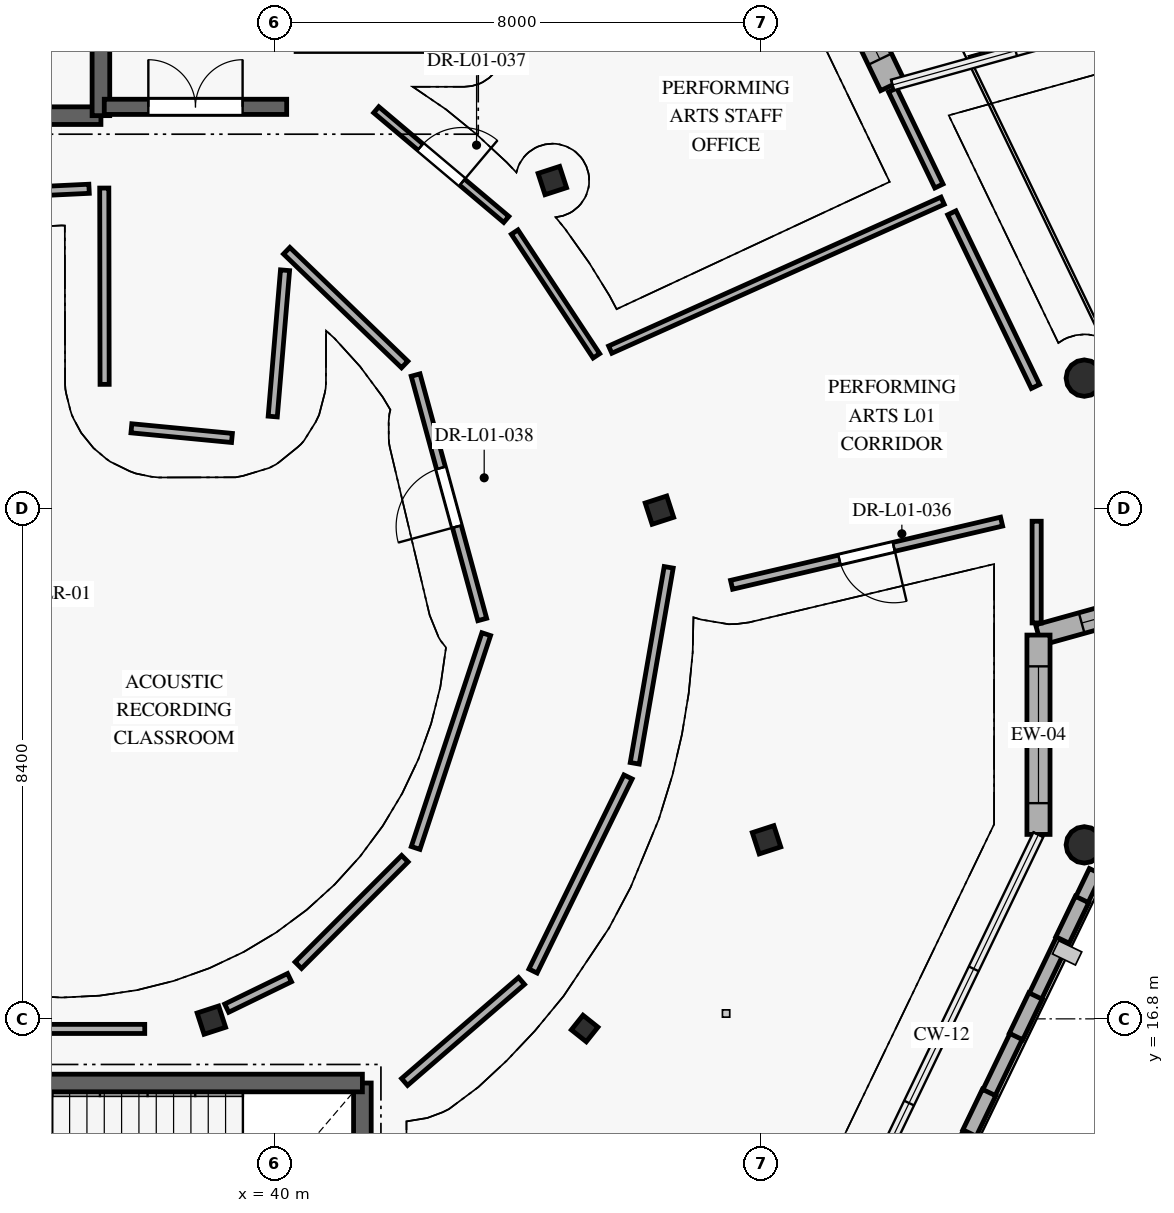
"""IFC4 building model, lengths in metres.
Left out: names, types, materials, properties, quantities, classifications, styles, units other than length and angle.
Written with IfcOpenShell. Run it as: python <this file> out.ifc"""

import sys

from ifc_helpers import new_model, si_unit, direction, frame, frame_2d, origin, origin_2d, place, context, subcontext, project, spatial, rectangle, circle, i_section, extrude, element, fill, save


model = new_model("IFC4")
c1 = context("Model", 3, precision=1e-05, world=origin(), true_north=direction((0.0, 1.0)))
c2 = subcontext(c1, "Body", "Model", "MODEL_VIEW")
j1 = project(units=[si_unit("LENGTHUNIT", "METRE"), si_unit("PLANEANGLEUNIT", "RADIAN")], contexts=[c1])
p1 = place(None, origin())
s1 = spatial("IfcSite", under=j1, at=p1, CompositionType="ELEMENT")
p2 = place(p1, origin())
s2 = spatial("IfcBuilding", under=s1, at=p2, CompositionType="ELEMENT")
p3 = place(p2, frame((0.0, 0.0, 4.2)))
s3 = spatial("IfcBuildingStorey", under=s2, at=p3, CompositionType="ELEMENT", Elevation=4.2)
for number, where, z_axis, x_axis in (
    (1, (38.961, 16.779, 0.0), (0.0, 0.0, 1.0), (0.951, 0.309, 0.0)),
    (2, (48.092, 19.746, 0.0), (0.0, 0.0, 1.0), (0.951, 0.309, 0.0)),
    (3, (46.33, 25.167, 0.0), (0.0, 0.0, 1.0), (0.951, 0.309, 0.0)),
    (4, (44.569, 30.588, 0.0), (0.0, 0.0, 1.0), (0.951, 0.309, 0.0)),
):
    element("IfcColumn", number, at=place(p3, frame(where, z_axis=z_axis, x_axis=x_axis)), inside=s3, PredefinedType="COLUMN", context=c2, shape_type="SweptSolid", body=[
        extrude(i_section(OverallWidth=0.373, OverallDepth=0.368, WebThickness=0.014, FlangeThickness=0.024, FilletRadius=0.015, at=origin_2d()), origin(), (0.0, 0.0, 1.0), 4.2),
    ])
for number, where, z_axis, x_axis in (
    (5, (53.317, 27.338, 0.0), (0.0, 0.0, 1.0), (-0.223, 0.975, 0.0)),
    (6, (53.317, 19.662, 0.0), (0.0, 0.0, 1.0), (0.223, 0.975, 0.0)),
):
    element("IfcColumn", number, at=place(p3, frame(where, z_axis=z_axis, x_axis=x_axis)), inside=s3, PredefinedType="COLUMN", context=c2, shape_type="SweptSolid", body=[
        extrude(circle(Radius=0.3, at=origin_2d()), origin(), (0.0, 0.0, 1.0), 4.2),
    ])
p4 = place(p3, frame((45.1, 16.642, 0.0), z_axis=(0.0, 0.0, 1.0), x_axis=(0.623470308046, 0.781847027868, 0.0)))
e7 = element("IfcColumn", 7, at=p4, inside=s3, PredefinedType="COLUMN", context=c2, shape_type="SweptSolid", body=[
    extrude(i_section(OverallWidth=0.307, OverallDepth=0.314, WebThickness=0.012, FlangeThickness=0.019, FilletRadius=0.015, at=origin_2d()), origin(), (0.0, 0.0, 1.0), 4.2),
])
p5 = place(p3, frame((59.259, 24.975, 0.0), z_axis=(0.0, 0.0, 1.0), x_axis=(-0.963400554219, -0.268065984658, 0.0)))
e8 = element("IfcWall", 8, at=p5, inside=s3, PredefinedType="SOLIDWALL", context=c2, shape_type="SweptSolid", body=[
    extrude(rectangle(XDim=6.95, YDim=0.35, at=frame_2d((3.475, 0.0))), origin(), (0.0, 0.0, 1.0), 3.94),
])
p6 = place(p5, frame((0.988, 0.0, 0.85)))
e9 = element("IfcOpeningElement", 9, at=p6, cuts=e8, PredefinedType="OPENING", context=c2, shape_type="SweptSolid", body=[
    extrude(rectangle(XDim=1.5, YDim=1.3, at=frame_2d((0.75, 0.65))), frame((0.0, 0.185, 0.0), z_axis=(0.0, -1.0, 0.0), x_axis=(1.0, 0.0, 0.0)), (0.0, 0.0, 1.0), 0.37),
])
p7 = place(p5, frame((4.212, 0.0, 0.85)))
e10 = element("IfcOpeningElement", 10, at=p7, cuts=e8, PredefinedType="OPENING", context=c2, shape_type="SweptSolid", body=[
    extrude(rectangle(XDim=2.0, YDim=1.3, at=frame_2d((1.0, 0.65))), frame((0.0, 0.185, 0.0), z_axis=(0.0, -1.0, 0.0), x_axis=(1.0, 0.0, 0.0)), (0.0, 0.0, 1.0), 0.37),
])
p8 = place(p3, frame((52.564, 23.112, 0.0), z_axis=(0.0, 0.0, 1.0), x_axis=(0.0, -1.0, 0.0)))
e11 = element("IfcWall", 11, at=p8, inside=s3, PredefinedType="SOLIDWALL", context=c2, shape_type="SweptSolid", body=[
    extrude(rectangle(XDim=3.279, YDim=0.38, at=frame_2d((1.639, 0.0))), origin(), (0.0, 0.0, 1.0), 3.94),
])
p9 = place(p8, frame((0.514, 0.0, 0.85)))
e12 = element("IfcOpeningElement", 12, at=p9, cuts=e11, PredefinedType="OPENING", context=c2, shape_type="SweptSolid", body=[
    extrude(rectangle(XDim=2.25, YDim=1.3, at=frame_2d((1.125, 0.65))), frame((0.0, 0.2, 0.0), z_axis=(0.0, -1.0, 0.0), x_axis=(1.0, 0.0, 0.0)), (0.0, 0.0, 1.0), 0.4),
])
p10 = place(p3, frame((49.382, 33.773, 0.0), z_axis=(0.0, 0.0, 1.0), x_axis=(0.433922119058, -0.90095038409, 0.0)))
e13 = element("IfcWall", 13, at=p10, inside=s3, PredefinedType="SOLIDWALL", context=c2, shape_type="SweptSolid", body=[
    extrude(rectangle(XDim=1.792, YDim=0.425, at=frame_2d((0.896, 0.0))), origin(), (0.0, 0.0, 1.0), 3.94),
])
p11 = place(p10, frame((0.471, 0.0, 0.85)))
e14 = element("IfcOpeningElement", 14, at=p11, cuts=e13, PredefinedType="OPENING", context=c2, shape_type="SweptSolid", body=[
    extrude(rectangle(XDim=0.85, YDim=1.4, at=frame_2d((0.425, 0.7))), frame((0.0, 0.222, 0.0), z_axis=(0.0, -1.0, 0.0), x_axis=(1.0, 0.0, 0.0)), (0.0, 0.0, 1.0), 0.445),
])
p12 = place(p3, frame((50.444, 12.875, 0.0), z_axis=(0.0, 0.0, 1.0), x_axis=(0.433874990127, 0.900973081142, 0.0)))
e15 = element("IfcWall", 15, at=p12, inside=s3, PredefinedType="ELEMENTEDWALL", context=c2, shape_type="SweptSolid", body=[
    extrude(rectangle(XDim=7.047, YDim=0.225, at=frame_2d((3.523, 0.0))), origin(), (0.0, 0.0, 1.0), 1.09),
])
p13 = place(p3, frame((51.43, 14.922, 1.09), z_axis=(0.0, 0.0, 1.0), x_axis=(0.433835457528, 0.900992117497, 0.0)))
e16 = element("IfcWall", 16, at=p13, inside=s3, PredefinedType="ELEMENTEDWALL", context=c2, shape_type="SweptSolid", body=[
    extrude(rectangle(XDim=0.74, YDim=0.245, at=frame_2d((0.37, 0.0))), origin(), (0.0, 0.0, 1.0), 2.85),
])
p14 = place(p3, frame((52.195, 16.51, 1.09), z_axis=(0.0, 0.0, 1.0), x_axis=(0.433964448544, 0.900929995837, 0.0)))
e17 = element("IfcWall", 17, at=p14, inside=s3, PredefinedType="ELEMENTEDWALL", context=c2, shape_type="SweptSolid", body=[
    extrude(rectangle(XDim=0.74, YDim=0.245, at=frame_2d((0.37, 0.0))), origin(), (0.0, 0.0, 1.0), 2.85),
])
p15 = place(p3, frame((52.959, 18.097, 1.09), z_axis=(0.0, 0.0, 1.0), x_axis=(0.433835457528, 0.900992117497, 0.0)))
e18 = element("IfcWall", 18, at=p15, inside=s3, PredefinedType="ELEMENTEDWALL", context=c2, shape_type="SweptSolid", body=[
    extrude(rectangle(XDim=0.74, YDim=0.245, at=frame_2d((0.37, 0.0))), origin(), (0.0, 0.0, 1.0), 2.85),
])
p16 = place(p3, frame((30.255, 31.655, 0.0), z_axis=(0.0, 0.0, 1.0), x_axis=(1.0, 0.0, 0.0)))
e19 = element("IfcWall", 19, at=p16, inside=s3, PredefinedType="SHEAR", context=c2, shape_type="SweptSolid", body=[
    extrude(rectangle(XDim=6.89, YDim=0.29, at=frame_2d((3.445, 0.0))), origin(), (0.0, 0.0, 1.0), 3.95),
])
p17 = place(p3, frame((37.145, 31.655, 0.0), z_axis=(0.0, 0.0, 1.0), x_axis=(0.0, 1.0, 0.0)))
e20 = element("IfcWall", 20, at=p17, inside=s3, PredefinedType="SHEAR", context=c2, shape_type="SweptSolid", body=[
    extrude(rectangle(XDim=6.29, YDim=0.29, at=frame_2d((3.145, 0.0))), origin(), (0.0, 0.0, 1.0), 3.95),
])
p18 = place(p17, frame((2.52, 0.0, 0.0)))
e21 = element("IfcOpeningElement", 21, at=p18, cuts=e20, PredefinedType="OPENING", context=c2, shape_type="SweptSolid", body=[
    extrude(rectangle(XDim=1.25, YDim=2.1, at=frame_2d((0.625, 1.05))), frame((0.0, 0.155, 0.0), z_axis=(0.0, -1.0, 0.0), x_axis=(1.0, 0.0, 0.0)), (0.0, 0.0, 1.0), 0.31),
])
p19 = place(p3, frame((37.2, 31.8, 0.0), z_axis=(0.0, 0.0, 1.0), x_axis=(1.0, 0.0, 0.0)))
e22 = element("IfcWall", 22, at=p19, inside=s3, PredefinedType="SHEAR", context=c2, shape_type="SweptSolid", body=[
    extrude(rectangle(XDim=3.0, YDim=0.25, at=frame_2d((1.5, 0.0))), origin(), (0.0, 0.0, 1.0), 3.95),
])
p20 = place(p19, frame((0.725, 0.0, 0.0)))
e23 = element("IfcOpeningElement", 23, at=p20, cuts=e22, PredefinedType="OPENING", context=c2, shape_type="SweptSolid", body=[
    extrude(rectangle(XDim=1.55, YDim=2.15, at=frame_2d((0.775, 1.075))), frame((0.0, 0.135, 0.0), z_axis=(0.0, -1.0, 0.0), x_axis=(1.0, 0.0, 0.0)), (0.0, 0.0, 1.0), 0.27),
])
p21 = place(p3, frame((41.445, 9.655, 0.0), z_axis=(0.0, 0.0, 1.0), x_axis=(0.0, 1.0, 0.0)))
e24 = element("IfcWall", 24, at=p21, inside=s3, PredefinedType="SHEAR", context=c2, shape_type="SweptSolid", body=[
    extrude(rectangle(XDim=6.09, YDim=0.29, at=frame_2d((3.045, 0.0))), origin(), (0.0, 0.0, 1.0), 3.95),
])
p22 = place(p3, frame((41.445, 15.745, 0.0), z_axis=(0.0, 0.0, 1.0), x_axis=(-1.0, 0.0, 0.0)))
e25 = element("IfcWall", 25, at=p22, inside=s3, PredefinedType="SHEAR", context=c2, shape_type="SweptSolid", body=[
    extrude(rectangle(XDim=6.79, YDim=0.29, at=frame_2d((3.395, 0.0))), origin(), (0.0, 0.0, 1.0), 3.95),
])
p23 = place(p3, frame((40.247, 17.478, 0.0), z_axis=(0.0, 0.0, 1.0), x_axis=(-0.899429373924, -0.437066129234, 0.0)))
e26 = element("IfcWall", 26, at=p23, inside=s3, PredefinedType="PARTITIONING", context=c2, shape_type="SweptSolid", body=[
    extrude(rectangle(XDim=1.148, YDim=0.15, at=frame_2d((0.574, 0.0))), origin(), (0.0, 0.0, 1.0), 3.219),
])
p24 = place(p3, frame((51.957, 24.978, 0.0), z_axis=(0.0, 0.0, 1.0), x_axis=(-0.973682617982, -0.227908225917, 0.0)))
e27 = element("IfcWall", 27, at=p24, inside=s3, PredefinedType="PARTITIONING", context=c2, shape_type="SweptSolid", body=[
    extrude(rectangle(XDim=4.56, YDim=0.15, at=frame_2d((2.28, 0.0))), origin(), (0.0, 0.0, 1.0), 3.9),
])
p25 = place(p24, frame((1.82, 0.0, 0.0)))
e28 = element("IfcOpeningElement", 28, at=p25, cuts=e27, PredefinedType="OPENING", context=c2, shape_type="SweptSolid", body=[
    extrude(rectangle(XDim=0.92, YDim=2.08, at=frame_2d((0.46, 1.04))), frame((0.0, 0.085, 0.0), z_axis=(0.0, -1.0, 0.0), x_axis=(1.0, 0.0, 0.0)), (0.0, 0.0, 1.0), 0.17),
])
p26 = place(p3, frame((46.482, 24.226, 0.0), z_axis=(0.0, 0.0, 1.0), x_axis=(-0.170701699763, -0.985322754075, 0.0)))
e29 = element("IfcWall", 29, at=p26, inside=s3, PredefinedType="PARTITIONING", context=c2, shape_type="SweptSolid", body=[
    extrude(rectangle(XDim=3.271, YDim=0.15, at=frame_2d((1.635, 0.0))), origin(), (0.0, 0.0, 1.0), 3.9),
])
p27 = place(p3, frame((45.814, 20.779, 0.0), z_axis=(0.0, 0.0, 1.0), x_axis=(-0.439779254339, -0.89810589991, 0.0)))
e30 = element("IfcWall", 30, at=p27, inside=s3, PredefinedType="PARTITIONING", context=c2, shape_type="SweptSolid", body=[
    extrude(rectangle(XDim=3.554, YDim=0.15, at=frame_2d((1.777, 0.0))), origin(), (0.0, 0.0, 1.0), 3.9),
])
p28 = place(p3, frame((44.062, 17.424, 0.0), z_axis=(0.0, 0.0, 1.0), x_axis=(-0.756768999512, -0.653682401, 0.0)))
e31 = element("IfcWall", 31, at=p28, inside=s3, PredefinedType="PARTITIONING", context=c2, shape_type="SweptSolid", body=[
    extrude(rectangle(XDim=2.541, YDim=0.15, at=frame_2d((1.271, 0.0))), origin(), (0.0, 0.0, 1.0), 3.9),
])
p29 = place(p3, frame((41.673, 31.752, 0.0), z_axis=(0.0, 0.0, 1.0), x_axis=(0.764524009618, -0.644595251858, 0.0)))
e32 = element("IfcWall", 32, at=p29, inside=s3, PredefinedType="PARTITIONING", context=c2, shape_type="SweptSolid", body=[
    extrude(rectangle(XDim=2.797, YDim=0.13, at=frame_2d((1.398, 0.0))), origin(), (0.0, 0.0, 1.0), 3.9),
])
p30 = place(p29, frame((0.948, 0.0, 0.0)))
e33 = element("IfcOpeningElement", 33, at=p30, cuts=e32, PredefinedType="OPENING", context=c2, shape_type="SweptSolid", body=[
    extrude(rectangle(XDim=0.9, YDim=2.05, at=frame_2d((0.45, 1.025))), frame((0.0, 0.075, 0.0), z_axis=(0.0, -1.0, 0.0), x_axis=(1.0, 0.0, 0.0)), (0.0, 0.0, 1.0), 0.15),
])
p31 = place(p3, frame((43.949, 29.74, 0.0), z_axis=(0.0, 0.0, 1.0), x_axis=(0.551022081773, -0.83449066226, 0.0)))
e34 = element("IfcWall", 34, at=p31, inside=s3, PredefinedType="PARTITIONING", context=c2, shape_type="SweptSolid", body=[
    extrude(rectangle(XDim=2.439, YDim=0.13, at=frame_2d((1.22, 0.0))), origin(), (0.0, 0.0, 1.0), 3.369),
])
p32 = place(p3, frame((45.521, 27.807, 0.0), z_axis=(0.0, 0.0, 1.0), x_axis=(0.912607408179, 0.408837031758, 0.0)))
e35 = element("IfcWall", 35, at=p32, inside=s3, PredefinedType="PARTITIONING", context=c2, shape_type="SweptSolid", body=[
    extrude(rectangle(XDim=5.99, YDim=0.13, at=frame_2d((2.995, 0.0))), origin(), (0.0, 0.0, 1.0), 3.9),
])
p33 = place(p3, frame((42.32, 19.611, 0.0), z_axis=(0.0, 0.0, 1.0), x_axis=(0.313635484033, 0.949543460383, 0.0)))
e36 = element("IfcWall", 36, at=p33, inside=s3, PredefinedType="PARTITIONING", context=c2, shape_type="SweptSolid", body=[
    extrude(rectangle(XDim=3.703, YDim=0.15, at=frame_2d((1.852, 0.0))), origin(), (0.0, 0.0, 1.0), 3.9),
])
p34 = place(p3, frame((43.416, 23.368, 0.0), z_axis=(0.0, 0.0, 1.0), x_axis=(-0.262938935949, 0.964812477097, 0.0)))
e37 = element("IfcWall", 37, at=p34, inside=s3, PredefinedType="PARTITIONING", context=c2, shape_type="SweptSolid", body=[
    extrude(rectangle(XDim=4.167, YDim=0.15, at=frame_2d((2.083, 0.0))), origin(), (0.0, 0.0, 1.0), 3.9),
])
p35 = place(p34, frame((1.584, 0.0, 0.0)))
e38 = element("IfcOpeningElement", 38, at=p35, cuts=e37, PredefinedType="OPENING", context=c2, shape_type="SweptSolid", body=[
    extrude(rectangle(XDim=1.0, YDim=2.1, at=frame_2d((0.5, 1.05))), frame((0.0, 0.085, 0.0), z_axis=(0.0, -1.0, 0.0), x_axis=(1.0, 0.0, 0.0)), (0.0, 0.0, 1.0), 0.17),
])
p36 = place(p3, frame((42.141, 27.562, 0.0), z_axis=(0.0, 0.0, 1.0), x_axis=(-0.719849143542, 0.694130542867, 0.0)))
e39 = element("IfcWall", 39, at=p36, inside=s3, PredefinedType="PARTITIONING", context=c2, shape_type="SweptSolid", body=[
    extrude(rectangle(XDim=2.696, YDim=0.15, at=frame_2d((1.348, 0.0))), origin(), (0.0, 0.0, 1.0), 3.9),
])
p37 = place(p3, frame((40.173, 29.112, 0.0), z_axis=(0.0, 0.0, 1.0), x_axis=(-0.083924087796, -0.996472150884, 0.0)))
e40 = element("IfcWall", 40, at=p37, inside=s3, PredefinedType="PARTITIONING", context=c2, shape_type="SweptSolid", body=[
    extrude(rectangle(XDim=2.415, YDim=0.15, at=frame_2d((1.207, 0.0))), origin(), (0.0, 0.0, 1.0), 3.9),
])
p38 = place(p3, frame((39.3, 26.354, 0.0), z_axis=(0.0, 0.0, 1.0), x_axis=(-0.995426515274, 0.095530375746, 0.0)))
e41 = element("IfcWall", 41, at=p38, inside=s3, PredefinedType="PARTITIONING", context=c2, shape_type="SweptSolid", body=[
    extrude(rectangle(XDim=1.661, YDim=0.15, at=frame_2d((0.831, 0.0))), origin(), (0.0, 0.0, 1.0), 3.9),
])
p39 = place(p3, frame((37.206, 27.236, 0.0), z_axis=(0.0, 0.0, 1.0), x_axis=(-0.001814879044, 0.999998353106, 0.0)))
e42 = element("IfcWall", 42, at=p39, inside=s3, PredefinedType="PARTITIONING", context=c2, shape_type="SweptSolid", body=[
    extrude(rectangle(XDim=3.229, YDim=0.15, at=frame_2d((1.614, 0.0))), origin(), (0.0, 0.0, 1.0), 3.9),
])
p40 = place(p3, frame((36.95, 30.452, 0.0), z_axis=(0.0, 0.0, 1.0), x_axis=(-0.998855948809, -0.04782043004, 0.0)))
e43 = element("IfcWall", 43, at=p40, inside=s3, PredefinedType="PARTITIONING", context=c2, shape_type="SweptSolid", body=[
    extrude(rectangle(XDim=1.818, YDim=0.15, at=frame_2d((0.909, 0.0))), origin(), (0.0, 0.0, 1.0), 3.9),
])
p41 = place(p3, frame((35.135, 16.635, 0.0), z_axis=(0.0, 0.0, 1.0), x_axis=(1.0, 0.0, 0.0)))
e44 = element("IfcWall", 44, at=p41, inside=s3, PredefinedType="PARTITIONING", context=c2, shape_type="SweptSolid", body=[
    extrude(rectangle(XDim=2.731, YDim=0.15, at=frame_2d((1.365, 0.0))), origin(), (0.0, 0.0, 1.0), 3.219),
])
p42 = place(p3, frame((40.391, 17.682, 0.0), z_axis=(0.0, 0.0, 1.0), x_axis=(0.70715603118, 0.707057527763, 0.0)))
e45 = element("IfcWall", 45, at=p42, inside=s3, PredefinedType="PARTITIONING", context=c2, shape_type="SweptSolid", body=[
    extrude(rectangle(XDim=2.479, YDim=0.15, at=frame_2d((1.239, 0.0))), origin(), (0.0, 0.0, 1.0), 3.9),
])
p43 = place(p3, frame((52.534, 24.984, 0.0), z_axis=(0.0, 0.0, 1.0), x_axis=(0.0, -1.0, 0.0)))
e46 = element("IfcWall", 46, at=p43, inside=s3, PredefinedType="PARTITIONING", context=c2, shape_type="SweptSolid", body=[
    extrude(rectangle(XDim=1.673, YDim=0.15, at=frame_2d((0.836, 0.0))), origin(), (0.0, 0.0, 1.0), 3.9),
])
p44 = place(p3, frame((50.166, 32.077, 0.0), z_axis=(0.0, 0.0, 1.0), x_axis=(0.433907727198, -0.900957315458, 0.0)))
e47 = element("IfcWall", 47, at=p44, inside=s3, PredefinedType="PARTITIONING", context=c2, shape_type="SweptSolid", body=[
    extrude(rectangle(XDim=1.753, YDim=0.15, at=frame_2d((0.876, 0.0))), origin(), (0.0, 0.0, 1.0), 3.9),
])
p45 = place(p3, frame((51.138, 30.057, 0.0), z_axis=(0.0, 0.0, 1.0), x_axis=(0.433887398365, -0.900967105693, 0.0)))
e48 = element("IfcWall", 48, at=p45, inside=s3, PredefinedType="PARTITIONING", context=c2, shape_type="SweptSolid", body=[
    extrude(rectangle(XDim=3.17, YDim=0.15, at=frame_2d((1.585, 0.0))), origin(), (0.0, 0.0, 1.0), 3.9),
])
p46 = place(p7, origin())
e49 = element("IfcWindow", 49, at=p46, inside=s3, PartitioningType="SINGLE_PANEL", PredefinedType="WINDOW", context=c2, shape_type="SweptSolid", body=[
    extrude(rectangle(XDim=2.0, YDim=1.3, at=frame_2d((1.0, 0.65))), frame((0.0, 0.03, 0.0), z_axis=(0.0, -1.0, 0.0), x_axis=(1.0, 0.0, 0.0)), (0.0, 0.0, 1.0), 0.06),
])
fill(e10, e49)
p47 = place(p9, origin())
e50 = element("IfcWindow", 50, at=p47, inside=s3, PartitioningType="SINGLE_PANEL", PredefinedType="WINDOW", context=c2, shape_type="SweptSolid", body=[
    extrude(rectangle(XDim=2.25, YDim=1.3, at=frame_2d((1.125, 0.65))), frame((0.0, 0.03, 0.0), z_axis=(0.0, -1.0, 0.0), x_axis=(1.0, 0.0, 0.0)), (0.0, 0.0, 1.0), 0.06),
])
fill(e12, e50)
p48 = place(p11, origin())
e51 = element("IfcWindow", 51, at=p48, inside=s3, PartitioningType="SINGLE_PANEL", PredefinedType="WINDOW", context=c2, shape_type="SweptSolid", body=[
    extrude(rectangle(XDim=0.85, YDim=1.4, at=frame_2d((0.425, 0.7))), frame((0.0, 0.03, 0.0), z_axis=(0.0, -1.0, 0.0), x_axis=(1.0, 0.0, 0.0)), (0.0, 0.0, 1.0), 0.06),
])
fill(e14, e51)
p49 = place(p20, origin())
e52 = element("IfcDoor", 52, at=p49, inside=s3, OperationType="DOUBLE_DOOR_SINGLE_SWING", PredefinedType="DOOR", context=c2, shape_type="SweptSolid", body=[
    extrude(rectangle(XDim=1.55, YDim=2.15, at=frame_2d((0.775, 1.075))), frame((0.0, 0.025, 0.0), z_axis=(0.0, -1.0, 0.0), x_axis=(1.0, 0.0, 0.0)), (0.0, 0.0, 1.0), 0.05),
])
fill(e23, e52)
p50 = place(p25, origin())
e53 = element("IfcDoor", 53, at=p50, inside=s3, OperationType="SINGLE_SWING_LEFT", PredefinedType="DOOR", context=c2, shape_type="SweptSolid", body=[
    extrude(rectangle(XDim=0.92, YDim=2.08, at=frame_2d((0.46, 1.04))), frame((0.0, 0.025, 0.0), z_axis=(0.0, -1.0, 0.0), x_axis=(1.0, 0.0, 0.0)), (0.0, 0.0, 1.0), 0.05),
])
fill(e28, e53)
p51 = place(p30, origin())
e54 = element("IfcDoor", 54, at=p51, inside=s3, OperationType="SINGLE_SWING_RIGHT", PredefinedType="DOOR", context=c2, shape_type="SweptSolid", body=[
    extrude(rectangle(XDim=0.9, YDim=2.05, at=frame_2d((0.45, 1.025))), frame((0.0, 0.025, 0.0), z_axis=(0.0, -1.0, 0.0), x_axis=(1.0, 0.0, 0.0)), (0.0, 0.0, 1.0), 0.05),
])
fill(e33, e54)
p52 = place(p35, origin())
e55 = element("IfcDoor", 55, at=p52, inside=s3, OperationType="SINGLE_SWING_LEFT", PredefinedType="DOOR", context=c2, shape_type="SweptSolid", body=[
    extrude(rectangle(XDim=1.0, YDim=2.1, at=frame_2d((0.5, 1.05))), frame((0.0, 0.025, 0.0), z_axis=(0.0, -1.0, 0.0), x_axis=(1.0, 0.0, 0.0)), (0.0, 0.0, 1.0), 0.05),
])
fill(e38, e55)
save(model, sys.argv[1])
